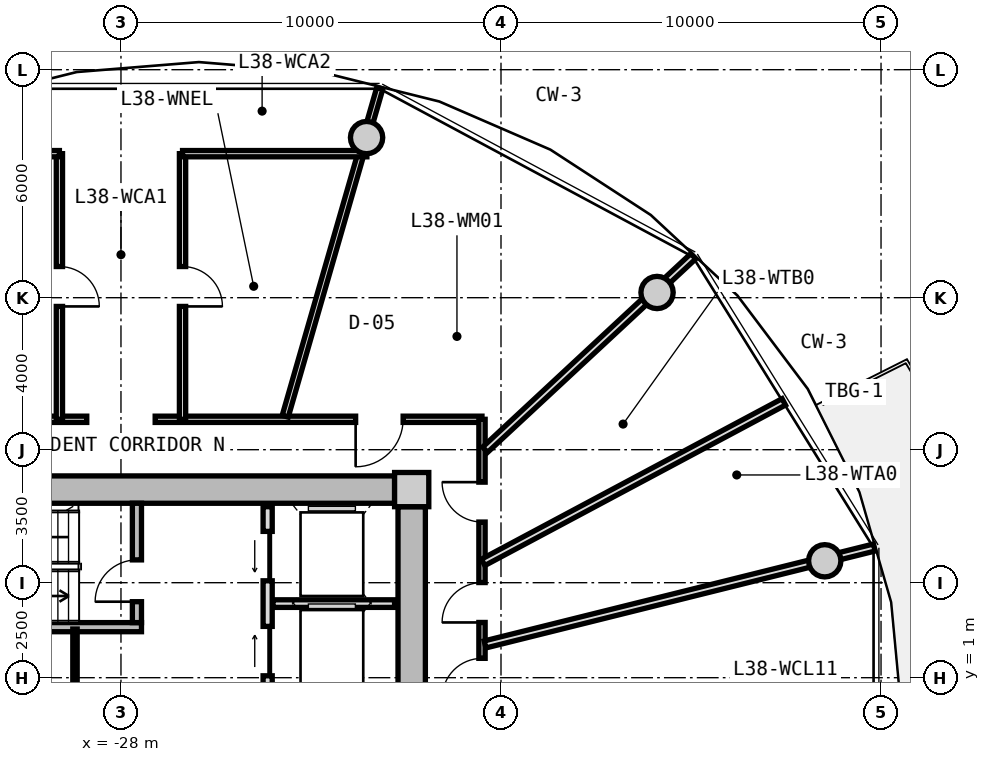
"""IFC4 building model, lengths in metres.
Left out: names, types, materials, properties, quantities, classifications, styles, units other than length and angle.
Written with IfcOpenShell. Run it as: python <this file> out.ifc"""

import sys

from ifc_helpers import new_model, si_unit, direction, frame, frame_2d, origin, origin_2d, place, context, subcontext, project, spatial, rectangle, circle, extrude, source, transform, mapped, element, fill, save


model = new_model("IFC4")
c1 = context("Model", 3, precision=1e-05, world=origin(), true_north=direction((0.0, 1.0)))
c2 = subcontext(c1, "Body", "Model", "MODEL_VIEW")
j1 = project(units=[si_unit("LENGTHUNIT", "METRE"), si_unit("PLANEANGLEUNIT", "RADIAN")], contexts=[c1])
p1 = place(None, origin())
s1 = spatial("IfcSite", under=j1, at=p1, CompositionType="ELEMENT")
p2 = place(p1, origin())
s2 = spatial("IfcBuilding", under=s1, at=p2, CompositionType="ELEMENT")
p3 = place(p2, frame((0.0, 0.0, 123.7)))
s3 = spatial("IfcBuildingStorey", under=s2, at=p3, CompositionType="ELEMENT", Elevation=123.7)
m1 = source(origin(), c2, "Body", "SweptSolid", [
    extrude(rectangle(XDim=0.9, YDim=0.9, at=origin_2d()), origin(), (0.0, 0.0, 1.0), 3.05),
])
p4 = place(p3, frame((-20.35, 5.95, 0.0), z_axis=(0.0, 0.0, 1.0), x_axis=(1.0, 0.0, 0.0)))
e1 = element("IfcColumn", 1, at=p4, inside=s3, PredefinedType="COLUMN", context=c2, shape_type="MappedRepresentation", body=[
    mapped(m1, transform((0.0, 0.0, 0.0), x_axis=(1.0, 0.0, 0.0), y_axis=(0.0, 1.0, 0.0), z_axis=(0.0, 0.0, 1.0), scale=1.0)),
])
m2 = source(origin(), c2, "Body", "SweptSolid", [
    extrude(rectangle(XDim=14.4, YDim=0.72, at=frame_2d((7.2, 0.0))), origin(), (0.0, 0.0, 1.0), 2.79),
])
p5 = place(p3, frame((-35.2, 5.95, 0.0), z_axis=(0.0, 0.0, 1.0), x_axis=(1.0, 0.0, 0.0)))
e2 = element("IfcWall", 2, at=p5, inside=s3, PredefinedType="SHEAR", context=c2, shape_type="MappedRepresentation", body=[
    mapped(m2, transform((0.0, 0.0, 0.0), x_axis=(1.0, 0.0, 0.0), y_axis=(0.0, 1.0, 0.0), z_axis=(0.0, 0.0, 1.0), scale=1.0)),
])
m3 = source(origin(), c2, "Body", "SweptSolid", [
    extrude(rectangle(XDim=11.0, YDim=0.72, at=frame_2d((5.5, 0.0))), origin(), (0.0, 0.0, 1.0), 2.79),
])
p6 = place(p3, frame((-20.35, 5.5, 0.0), z_axis=(0.0, 0.0, 1.0), x_axis=(0.0, -1.0, 0.0)))
e3 = element("IfcWall", 3, at=p6, inside=s3, PredefinedType="SHEAR", context=c2, shape_type="MappedRepresentation", body=[
    mapped(m3, transform((0.0, 0.0, 0.0), x_axis=(1.0, 0.0, 0.0), y_axis=(0.0, 1.0, 0.0), z_axis=(0.0, 0.0, 1.0), scale=1.0)),
])
p7 = place(p6, frame((5.65, 0.0, 0.0)))
e4 = element("IfcOpeningElement", 4, at=p7, cuts=e3, PredefinedType="OPENING", context=c2, shape_type="SweptSolid", body=[
    extrude(rectangle(XDim=1.2, YDim=2.15, at=frame_2d((0.6, 1.075))), frame((0.0, 0.37, 0.0), z_axis=(0.0, -1.0, 0.0), x_axis=(1.0, 0.0, 0.0)), (0.0, 0.0, 1.0), 0.74),
])
m4 = source(origin(), c2, "Body", "SweptSolid", [
    extrude(circle(Radius=0.425, at=origin_2d()), origin(), (0.0, 0.0, 1.0), 3.05),
])
for number, where, z_axis, x_axis in (
    (5, (-9.481, 4.076, 0.0), (0.0, 0.0, 1.0), (1.0, 0.0, 0.0)),
    (6, (-13.894, 11.137, 0.0), (0.0, 0.0, 1.0), (1.0, 0.0, 0.0)),
    (7, (-21.537, 15.213, 0.0), (0.0, 0.0, 1.0), (1.0, 0.0, 0.0)),
):
    element("IfcColumn", number, at=place(p3, frame(where, z_axis=z_axis, x_axis=x_axis)), inside=s3, PredefinedType="COLUMN", context=c2, shape_type="MappedRepresentation", body=[
        mapped(m4, transform((0.0, 0.0, 0.0), x_axis=(1.0, 0.0, 0.0), y_axis=(0.0, 1.0, 0.0), z_axis=(0.0, 0.0, 1.0), scale=1.0)),
    ])
m5 = source(origin(), c2, "Body", "SweptSolid", [
    extrude(rectangle(XDim=7.83, YDim=0.24, at=frame_2d((3.915, 0.0))), origin(), (0.0, 0.0, 1.0), 2.79),
])
p8 = place(p3, frame((-35.29, 2.33, 0.0), z_axis=(0.0, 0.0, 1.0), x_axis=(1.0, 0.0, 0.0)))
e8 = element("IfcWall", 8, at=p8, inside=s3, PredefinedType="PARTITIONING", context=c2, shape_type="MappedRepresentation", body=[
    mapped(m5, transform((0.0, 0.0, 0.0), x_axis=(1.0, 0.0, 0.0), y_axis=(0.0, 1.0, 0.0), z_axis=(0.0, 0.0, 1.0), scale=1.0)),
])
m6 = source(origin(), c2, "Body", "SweptSolid", [
    extrude(rectangle(XDim=3.14, YDim=0.24, at=frame_2d((1.57, 0.0))), origin(), (0.0, 0.0, 1.0), 2.79),
])
p9 = place(p3, frame((-27.58, 2.45, 0.0), z_axis=(0.0, 0.0, 1.0), x_axis=(0.0, 1.0, 0.0)))
e9 = element("IfcWall", 9, at=p9, inside=s3, PredefinedType="PARTITIONING", context=c2, shape_type="MappedRepresentation", body=[
    mapped(m6, transform((0.0, 0.0, 0.0), x_axis=(1.0, 0.0, 0.0), y_axis=(0.0, 1.0, 0.0), z_axis=(0.0, 0.0, 1.0), scale=1.0)),
])
p10 = place(p9, frame((0.55, 0.0, 0.0)))
e10 = element("IfcOpeningElement", 10, at=p10, cuts=e9, PredefinedType="OPENING", context=c2, shape_type="SweptSolid", body=[
    extrude(rectangle(XDim=1.1, YDim=2.15, at=frame_2d((0.55, 1.075))), frame((0.0, 0.13, 0.0), z_axis=(0.0, -1.0, 0.0), x_axis=(1.0, 0.0, 0.0)), (0.0, 0.0, 1.0), 0.26),
])
m7 = source(origin(), c2, "Body", "SweptSolid", [
    extrude(rectangle(XDim=5.0, YDim=0.24, at=frame_2d((2.5, 0.0))), origin(), (0.0, 0.0, 1.0), 2.775),
])
p11 = place(p3, frame((-24.14, 0.5, 0.0), z_axis=(0.0, 0.0, 1.0), x_axis=(0.0, 1.0, 0.0)))
e11 = element("IfcWall", 11, at=p11, inside=s3, PredefinedType="PARTITIONING", context=c2, shape_type="MappedRepresentation", body=[
    mapped(m7, transform((0.0, 0.0, 0.0), x_axis=(1.0, 0.0, 0.0), y_axis=(0.0, 1.0, 0.0), z_axis=(0.0, 0.0, 1.0), scale=1.0)),
])
p12 = place(p11, frame((3.05, 0.0, 0.0)))
e12 = element("IfcOpeningElement", 12, at=p12, cuts=e11, PredefinedType="OPENING", context=c2, shape_type="SweptSolid", body=[
    extrude(rectangle(XDim=1.3, YDim=2.2, at=frame_2d((0.65, 1.1))), frame((0.0, 0.13, 0.0), z_axis=(0.0, -1.0, 0.0), x_axis=(1.0, 0.0, 0.0)), (0.0, 0.0, 1.0), 0.26),
])
p13 = place(p11, frame((0.55, 0.0, 0.0)))
e13 = element("IfcOpeningElement", 13, at=p13, cuts=e11, PredefinedType="OPENING", context=c2, shape_type="SweptSolid", body=[
    extrude(rectangle(XDim=1.3, YDim=2.2, at=frame_2d((0.65, 1.1))), frame((0.0, 0.13, 0.0), z_axis=(0.0, -1.0, 0.0), x_axis=(1.0, 0.0, 0.0)), (0.0, 0.0, 1.0), 0.26),
])
m8 = source(origin(), c2, "Body", "SweptSolid", [
    extrude(rectangle(XDim=3.2, YDim=0.2, at=frame_2d((1.6, 0.0))), origin(), (0.0, 0.0, 1.0), 2.775),
])
p14 = place(p3, frame((-24.0, 2.95, 0.0), z_axis=(0.0, 0.0, 1.0), x_axis=(1.0, 0.0, 0.0)))
e14 = element("IfcWall", 14, at=p14, inside=s3, PredefinedType="PARTITIONING", context=c2, shape_type="MappedRepresentation", body=[
    mapped(m8, transform((0.0, 0.0, 0.0), x_axis=(1.0, 0.0, 0.0), y_axis=(0.0, 1.0, 0.0), z_axis=(0.0, 0.0, 1.0), scale=1.0)),
])
m9 = source(origin(), c2, "Body", "SweptSolid", [
    extrude(rectangle(XDim=2.33, YDim=0.115, at=frame_2d((1.165, 0.0))), origin(), (0.0, 0.0, 1.0), 2.775),
])
p15 = place(p3, frame((-29.21, -0.05, 0.0), z_axis=(0.0, 0.0, 1.0), x_axis=(0.0, 1.0, 0.0)))
e15 = element("IfcWall", 15, at=p15, inside=s3, PredefinedType="PARTITIONING", context=c2, shape_type="MappedRepresentation", body=[
    mapped(m9, transform((0.0, 0.0, 0.0), x_axis=(1.0, 0.0, 0.0), y_axis=(0.0, 1.0, 0.0), z_axis=(0.0, 0.0, 1.0), scale=1.0)),
])
m10 = source(origin(), c2, "Body", "SweptSolid", [
    extrude(rectangle(XDim=8.6, YDim=0.165, at=frame_2d((4.3, 0.0))), origin(), (0.0, 0.0, 1.0), 2.775),
])
p16 = place(p3, frame((-37.5, 7.8, 0.0), z_axis=(0.0, 0.0, 1.0), x_axis=(1.0, 0.0, 0.0)))
e16 = element("IfcWall", 16, at=p16, inside=s3, PredefinedType="PARTITIONING", context=c2, shape_type="MappedRepresentation", body=[
    mapped(m10, transform((0.0, 0.0, 0.0), x_axis=(1.0, 0.0, 0.0), y_axis=(0.0, 1.0, 0.0), z_axis=(0.0, 0.0, 1.0), scale=1.0)),
])
p17 = place(p3, frame((-27.1, 7.8, 0.0), z_axis=(0.0, 0.0, 1.0), x_axis=(1.0, 0.0, 0.0)))
e17 = element("IfcWall", 17, at=p17, inside=s3, PredefinedType="PARTITIONING", context=c2, shape_type="MappedRepresentation", body=[
    mapped(m10, transform((0.0, 0.0, 0.0), x_axis=(1.0, 0.0, 0.0), y_axis=(0.0, 1.0, 0.0), z_axis=(0.0, 0.0, 1.0), scale=1.0)),
])
p18 = place(p17, frame((5.275, 0.0, 0.0)))
e18 = element("IfcOpeningElement", 18, at=p18, cuts=e17, PredefinedType="OPENING", context=c2, shape_type="SweptSolid", body=[
    extrude(rectangle(XDim=1.25, YDim=2.2, at=frame_2d((0.625, 1.1))), frame((0.0, 0.093, 0.0), z_axis=(0.0, -1.0, 0.0), x_axis=(1.0, 0.0, 0.0)), (0.0, 0.0, 1.0), 0.185),
])
m11 = source(origin(), c2, "Body", "SweptSolid", [
    extrude(rectangle(XDim=15.6, YDim=0.165, at=frame_2d((7.8, 0.0))), origin(), (0.0, 0.0, 1.0), 2.775),
])
p19 = place(p3, frame((-18.5, 7.8, 0.0), z_axis=(0.0, 0.0, 1.0), x_axis=(0.0, -1.0, 0.0)))
e19 = element("IfcWall", 19, at=p19, inside=s3, PredefinedType="PARTITIONING", context=c2, shape_type="MappedRepresentation", body=[
    mapped(m11, transform((0.0, 0.0, 0.0), x_axis=(1.0, 0.0, 0.0), y_axis=(0.0, 1.0, 0.0), z_axis=(0.0, 0.0, 1.0), scale=1.0)),
])
p20 = place(p19, frame((12.002, 0.0, 0.0)))
e20 = element("IfcOpeningElement", 20, at=p20, cuts=e19, PredefinedType="OPENING", context=c2, shape_type="SweptSolid", body=[
    extrude(rectangle(XDim=1.05, YDim=2.15, at=frame_2d((0.525, 1.075))), frame((0.0, 0.093, 0.0), z_axis=(0.0, -1.0, 0.0), x_axis=(1.0, 0.0, 0.0)), (0.0, 0.0, 1.0), 0.185),
])
p21 = place(p19, frame((10.211, 0.0, 0.0)))
e21 = element("IfcOpeningElement", 21, at=p21, cuts=e19, PredefinedType="OPENING", context=c2, shape_type="SweptSolid", body=[
    extrude(rectangle(XDim=1.05, YDim=2.15, at=frame_2d((0.525, 1.075))), frame((0.0, 0.093, 0.0), z_axis=(0.0, -1.0, 0.0), x_axis=(1.0, 0.0, 0.0)), (0.0, 0.0, 1.0), 0.185),
])
p22 = place(p19, frame((7.722, 0.0, 0.0)))
e22 = element("IfcOpeningElement", 22, at=p22, cuts=e19, PredefinedType="OPENING", context=c2, shape_type="SweptSolid", body=[
    extrude(rectangle(XDim=1.05, YDim=2.15, at=frame_2d((0.525, 1.075))), frame((0.0, 0.093, 0.0), z_axis=(0.0, -1.0, 0.0), x_axis=(1.0, 0.0, 0.0)), (0.0, 0.0, 1.0), 0.185),
])
p23 = place(p19, frame((6.291, 0.0, 0.0)))
e23 = element("IfcOpeningElement", 23, at=p23, cuts=e19, PredefinedType="OPENING", context=c2, shape_type="SweptSolid", body=[
    extrude(rectangle(XDim=1.05, YDim=2.15, at=frame_2d((0.525, 1.075))), frame((0.0, 0.093, 0.0), z_axis=(0.0, -1.0, 0.0), x_axis=(1.0, 0.0, 0.0)), (0.0, 0.0, 1.0), 0.185),
])
p24 = place(p19, frame((4.296, 0.0, 0.0)))
e24 = element("IfcOpeningElement", 24, at=p24, cuts=e19, PredefinedType="OPENING", context=c2, shape_type="SweptSolid", body=[
    extrude(rectangle(XDim=1.05, YDim=2.15, at=frame_2d((0.525, 1.075))), frame((0.0, 0.093, 0.0), z_axis=(0.0, -1.0, 0.0), x_axis=(1.0, 0.0, 0.0)), (0.0, 0.0, 1.0), 0.185),
])
p25 = place(p19, frame((1.654, 0.0, 0.0)))
e25 = element("IfcOpeningElement", 25, at=p25, cuts=e19, PredefinedType="OPENING", context=c2, shape_type="SweptSolid", body=[
    extrude(rectangle(XDim=1.05, YDim=2.15, at=frame_2d((0.525, 1.075))), frame((0.0, 0.093, 0.0), z_axis=(0.0, -1.0, 0.0), x_axis=(1.0, 0.0, 0.0)), (0.0, 0.0, 1.0), 0.185),
])
m12 = source(origin(), c2, "Body", "SweptSolid", [
    extrude(rectangle(XDim=8.989, YDim=0.165, at=frame_2d((4.495, 0.0))), origin(), (0.0, 0.0, 1.0), 2.275),
])
p26 = place(p3, frame((-23.678, 7.88, 0.0), z_axis=(0.0, 0.0, 1.0), x_axis=(0.27702323008, 0.960863221274, 0.0)))
e26 = element("IfcWall", 26, at=p26, inside=s3, PredefinedType="PARTITIONING", context=c2, shape_type="MappedRepresentation", body=[
    mapped(m12, transform((0.0, 0.0, 0.0), x_axis=(1.0, 0.0, 0.0), y_axis=(0.0, 1.0, 0.0), z_axis=(0.0, 0.0, 1.0), scale=1.0)),
])
m13 = source(origin(), c2, "Body", "SweptSolid", [
    extrude(rectangle(XDim=6.99, YDim=0.165, at=frame_2d((3.495, 0.0))), origin(), (0.0, 0.0, 1.0), 2.275),
])
p27 = place(p3, frame((-29.62, 7.8, 0.0), z_axis=(0.0, 0.0, 1.0), x_axis=(0.0, 1.0, 0.0)))
e27 = element("IfcWall", 27, at=p27, inside=s3, PredefinedType="PARTITIONING", context=c2, shape_type="MappedRepresentation", body=[
    mapped(m13, transform((0.0, 0.0, 0.0), x_axis=(1.0, 0.0, 0.0), y_axis=(0.0, 1.0, 0.0), z_axis=(0.0, 0.0, 1.0), scale=1.0)),
])
p28 = place(p27, frame((2.97, 0.0, 0.0)))
e28 = element("IfcOpeningElement", 28, at=p28, cuts=e27, PredefinedType="OPENING", context=c2, shape_type="SweptSolid", body=[
    extrude(rectangle(XDim=1.05, YDim=2.15, at=frame_2d((0.525, 1.075))), frame((0.0, 0.093, 0.0), z_axis=(0.0, -1.0, 0.0), x_axis=(1.0, 0.0, 0.0)), (0.0, 0.0, 1.0), 0.185),
])
m14 = source(origin(), c2, "Body", "SweptSolid", [
    extrude(rectangle(XDim=4.569, YDim=0.165, at=frame_2d((2.285, 0.0))), origin(), (0.0, 0.0, 1.0), 2.775),
])
p29 = place(p3, frame((-34.189, 14.79, 0.0), z_axis=(0.0, 0.0, 1.0), x_axis=(1.0, 0.0, 0.0)))
e29 = element("IfcWall", 29, at=p29, inside=s3, PredefinedType="PARTITIONING", context=c2, shape_type="MappedRepresentation", body=[
    mapped(m14, transform((0.0, 0.0, 0.0), x_axis=(1.0, 0.0, 0.0), y_axis=(0.0, 1.0, 0.0), z_axis=(0.0, 0.0, 1.0), scale=1.0)),
])
m15 = source(origin(), c2, "Body", "SweptSolid", [
    extrude(rectangle(XDim=6.99, YDim=0.165, at=frame_2d((3.495, 0.0))), origin(), (0.0, 0.0, 1.0), 2.775),
])
p30 = place(p3, frame((-26.38, 7.8, 0.0), z_axis=(0.0, 0.0, 1.0), x_axis=(0.0, 1.0, 0.0)))
e30 = element("IfcWall", 30, at=p30, inside=s3, PredefinedType="PARTITIONING", context=c2, shape_type="MappedRepresentation", body=[
    mapped(m15, transform((0.0, 0.0, 0.0), x_axis=(1.0, 0.0, 0.0), y_axis=(0.0, 1.0, 0.0), z_axis=(0.0, 0.0, 1.0), scale=1.0)),
])
p31 = place(p30, frame((2.97, 0.0, 0.0)))
e31 = element("IfcOpeningElement", 31, at=p31, cuts=e30, PredefinedType="OPENING", context=c2, shape_type="SweptSolid", body=[
    extrude(rectangle(XDim=1.05, YDim=2.15, at=frame_2d((0.525, 1.075))), frame((0.0, 0.093, 0.0), z_axis=(0.0, -1.0, 0.0), x_axis=(1.0, 0.0, 0.0)), (0.0, 0.0, 1.0), 0.185),
])
m16 = source(origin(), c2, "Body", "SweptSolid", [
    extrude(rectangle(XDim=4.851, YDim=0.165, at=frame_2d((2.425, 0.0))), origin(), (0.0, 0.0, 1.0), 2.775),
])
p32 = place(p3, frame((-26.38, 14.79, 0.0), z_axis=(0.0, 0.0, 1.0), x_axis=(1.0, 0.0, 0.0)))
e32 = element("IfcWall", 32, at=p32, inside=s3, PredefinedType="PARTITIONING", context=c2, shape_type="MappedRepresentation", body=[
    mapped(m16, transform((0.0, 0.0, 0.0), x_axis=(1.0, 0.0, 0.0), y_axis=(0.0, 1.0, 0.0), z_axis=(0.0, 0.0, 1.0), scale=1.0)),
])
m17 = source(origin(), c2, "Body", "SweptSolid", [
    extrude(rectangle(XDim=10.556, YDim=0.19, at=frame_2d((5.278, 0.0))), origin(), (0.0, 0.0, 1.0), 2.275),
])
p33 = place(p3, frame((-18.42, 1.875, 0.0), z_axis=(0.0, 0.0, 1.0), x_axis=(0.970363857851, 0.241648470667, 0.0)))
e33 = element("IfcWall", 33, at=p33, inside=s3, PredefinedType="PARTITIONING", context=c2, shape_type="MappedRepresentation", body=[
    mapped(m17, transform((0.0, 0.0, 0.0), x_axis=(1.0, 0.0, 0.0), y_axis=(0.0, 1.0, 0.0), z_axis=(0.0, 0.0, 1.0), scale=1.0)),
])
m18 = source(origin(), c2, "Body", "SweptSolid", [
    extrude(rectangle(XDim=7.482, YDim=0.19, at=frame_2d((3.741, 0.0))), origin(), (0.0, 0.0, 1.0), 2.275),
])
p34 = place(p3, frame((-18.42, 6.998, 0.0), z_axis=(0.0, 0.0, 1.0), x_axis=(0.732508698043, 0.680757671489, 0.0)))
e34 = element("IfcWall", 34, at=p34, inside=s3, PredefinedType="PARTITIONING", context=c2, shape_type="MappedRepresentation", body=[
    mapped(m18, transform((0.0, 0.0, 0.0), x_axis=(1.0, 0.0, 0.0), y_axis=(0.0, 1.0, 0.0), z_axis=(0.0, 0.0, 1.0), scale=1.0)),
])
m19 = source(origin(), c2, "Body", "SweptSolid", [
    extrude(rectangle(XDim=8.968, YDim=0.19, at=frame_2d((4.484, 0.0))), origin(), (0.0, 0.0, 1.0), 2.775),
])
p35 = place(p3, frame((-18.47, 4.036, 0.0), z_axis=(0.0, 0.0, 1.0), x_axis=(0.882202936563, 0.47086938605, 0.0)))
e35 = element("IfcWall", 35, at=p35, inside=s3, PredefinedType="PARTITIONING", context=c2, shape_type="MappedRepresentation", body=[
    mapped(m19, transform((0.0, 0.0, 0.0), x_axis=(1.0, 0.0, 0.0), y_axis=(0.0, 1.0, 0.0), z_axis=(0.0, 0.0, 1.0), scale=1.0)),
])
m20 = source(origin(), c2, "Body", "SweptSolid", [
    extrude(rectangle(XDim=1.1, YDim=2.15, at=frame_2d((0.55, 1.075))), frame((0.0, 0.025, 0.0), z_axis=(0.0, -1.0, 0.0), x_axis=(1.0, 0.0, 0.0)), (0.0, 0.0, 1.0), 0.05),
])
p36 = place(p10, origin())
e36 = element("IfcDoor", 36, at=p36, inside=s3, OperationType="SINGLE_SWING_LEFT", PredefinedType="DOOR", context=c2, shape_type="MappedRepresentation", body=[
    mapped(m20, transform((0.0, 0.0, 0.0), x_axis=(1.0, 0.0, 0.0), y_axis=(0.0, 1.0, 0.0), z_axis=(0.0, 0.0, 1.0), scale=1.0)),
])
fill(e10, e36)
m21 = source(origin(), c2, "Body", "SweptSolid", [
    extrude(rectangle(XDim=1.3, YDim=2.2, at=frame_2d((0.65, 1.1))), frame((0.0, 0.025, 0.0), z_axis=(0.0, -1.0, 0.0), x_axis=(1.0, 0.0, 0.0)), (0.0, 0.0, 1.0), 0.05),
])
p37 = place(p12, origin())
e37 = element("IfcDoor", 37, at=p37, inside=s3, OperationType="SLIDING_TO_LEFT", PredefinedType="DOOR", context=c2, shape_type="MappedRepresentation", body=[
    mapped(m21, transform((0.0, 0.0, 0.0), x_axis=(1.0, 0.0, 0.0), y_axis=(0.0, 1.0, 0.0), z_axis=(0.0, 0.0, 1.0), scale=1.0)),
])
fill(e12, e37)
p38 = place(p13, origin())
e38 = element("IfcDoor", 38, at=p38, inside=s3, OperationType="SLIDING_TO_RIGHT", PredefinedType="DOOR", context=c2, shape_type="MappedRepresentation", body=[
    mapped(m21, transform((0.0, 0.0, 0.0), x_axis=(1.0, 0.0, 0.0), y_axis=(0.0, 1.0, 0.0), z_axis=(0.0, 0.0, 1.0), scale=1.0)),
])
fill(e13, e38)
m22 = source(origin(), c2, "Body", "SweptSolid", [
    extrude(rectangle(XDim=1.05, YDim=2.15, at=frame_2d((0.525, 1.075))), frame((0.0, 0.025, 0.0), z_axis=(0.0, -1.0, 0.0), x_axis=(1.0, 0.0, 0.0)), (0.0, 0.0, 1.0), 0.05),
])
p39 = place(p28, frame((1.05, 0.0, 0.0), z_axis=(0.0, 0.0, 1.0), x_axis=(-1.0, 0.0, 0.0)))
e39 = element("IfcDoor", 39, at=p39, inside=s3, OperationType="SINGLE_SWING_RIGHT", PredefinedType="DOOR", context=c2, shape_type="MappedRepresentation", body=[
    mapped(m22, transform((0.0, 0.0, 0.0), x_axis=(1.0, 0.0, 0.0), y_axis=(0.0, 1.0, 0.0), z_axis=(0.0, 0.0, 1.0), scale=1.0)),
])
fill(e28, e39)
p40 = place(p31, frame((1.05, 0.0, 0.0), z_axis=(0.0, 0.0, 1.0), x_axis=(-1.0, 0.0, 0.0)))
e40 = element("IfcDoor", 40, at=p40, inside=s3, OperationType="SINGLE_SWING_RIGHT", PredefinedType="DOOR", context=c2, shape_type="MappedRepresentation", body=[
    mapped(m22, transform((0.0, 0.0, 0.0), x_axis=(1.0, 0.0, 0.0), y_axis=(0.0, 1.0, 0.0), z_axis=(0.0, 0.0, 1.0), scale=1.0)),
])
fill(e31, e40)
p41 = place(p23, frame((1.05, 0.0, 0.0), z_axis=(0.0, 0.0, 1.0), x_axis=(-1.0, 0.0, 0.0)))
e41 = element("IfcDoor", 41, at=p41, inside=s3, OperationType="SINGLE_SWING_LEFT", PredefinedType="DOOR", context=c2, shape_type="MappedRepresentation", body=[
    mapped(m22, transform((0.0, 0.0, 0.0), x_axis=(1.0, 0.0, 0.0), y_axis=(0.0, 1.0, 0.0), z_axis=(0.0, 0.0, 1.0), scale=1.0)),
])
fill(e23, e41)
p42 = place(p24, frame((1.05, 0.0, 0.0), z_axis=(0.0, 0.0, 1.0), x_axis=(-1.0, 0.0, 0.0)))
e42 = element("IfcDoor", 42, at=p42, inside=s3, OperationType="SINGLE_SWING_LEFT", PredefinedType="DOOR", context=c2, shape_type="MappedRepresentation", body=[
    mapped(m22, transform((0.0, 0.0, 0.0), x_axis=(1.0, 0.0, 0.0), y_axis=(0.0, 1.0, 0.0), z_axis=(0.0, 0.0, 1.0), scale=1.0)),
])
fill(e24, e42)
p43 = place(p25, frame((1.05, 0.0, 0.0), z_axis=(0.0, 0.0, 1.0), x_axis=(-1.0, 0.0, 0.0)))
e43 = element("IfcDoor", 43, at=p43, inside=s3, OperationType="SINGLE_SWING_RIGHT", PredefinedType="DOOR", context=c2, shape_type="MappedRepresentation", body=[
    mapped(m22, transform((0.0, 0.0, 0.0), x_axis=(1.0, 0.0, 0.0), y_axis=(0.0, 1.0, 0.0), z_axis=(0.0, 0.0, 1.0), scale=1.0)),
])
fill(e25, e43)
m23 = source(origin(), c2, "Body", "SweptSolid", [
    extrude(rectangle(XDim=1.25, YDim=2.2, at=frame_2d((0.625, 1.1))), frame((0.0, 0.025, 0.0), z_axis=(0.0, -1.0, 0.0), x_axis=(1.0, 0.0, 0.0)), (0.0, 0.0, 1.0), 0.05),
])
p44 = place(p18, frame((1.25, 0.0, 0.0), z_axis=(0.0, 0.0, 1.0), x_axis=(-1.0, 0.0, 0.0)))
e44 = element("IfcDoor", 44, at=p44, inside=s3, OperationType="SINGLE_SWING_RIGHT", PredefinedType="DOOR", context=c2, shape_type="MappedRepresentation", body=[
    mapped(m23, transform((0.0, 0.0, 0.0), x_axis=(1.0, 0.0, 0.0), y_axis=(0.0, 1.0, 0.0), z_axis=(0.0, 0.0, 1.0), scale=1.0)),
])
fill(e18, e44)
save(model, sys.argv[1])
